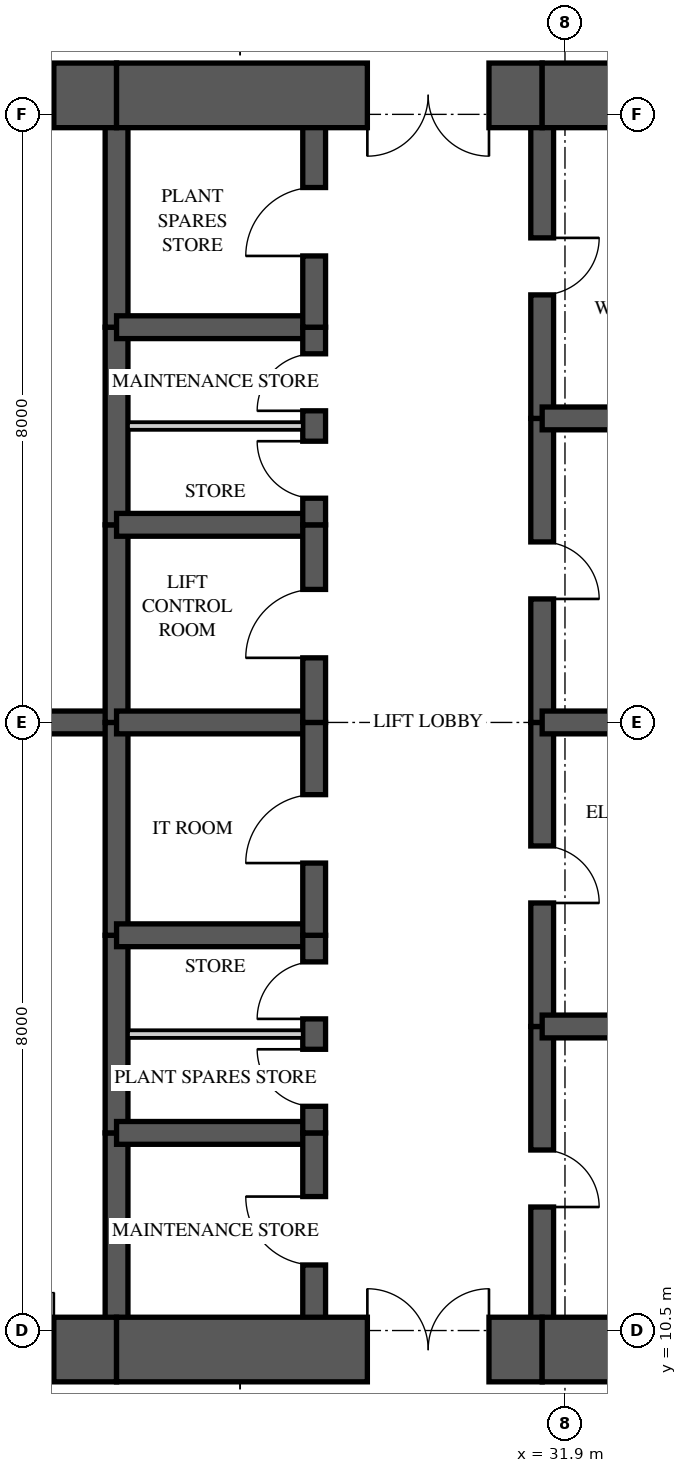
"""IFC4 building model, lengths in metres.
Left out: names, types, materials, properties, quantities, classifications, styles, units other than length and angle.
Written with IfcOpenShell. Run it as: python <this file> out.ifc"""

import sys

from ifc_helpers import new_model, si_unit, direction, frame, frame_2d, origin, place, context, subcontext, project, spatial, rectangle, extrude, element, fill, save


model = new_model("IFC4")
c1 = context("Model", 3, precision=1e-05, world=origin(), true_north=direction((0.0, 1.0)))
c2 = subcontext(c1, "Body", "Model", "MODEL_VIEW")
j1 = project(units=[si_unit("LENGTHUNIT", "METRE"), si_unit("PLANEANGLEUNIT", "RADIAN")], contexts=[c1])
p1 = place(None, origin())
s1 = spatial("IfcSite", under=j1, at=p1, CompositionType="ELEMENT")
p2 = place(p1, origin())
s2 = spatial("IfcBuilding", under=s1, at=p2, CompositionType="ELEMENT")
p3 = place(p2, frame((0.0, 0.0, 272.75)))
s3 = spatial("IfcBuildingStorey", under=s2, at=p3, CompositionType="ELEMENT", Elevation=272.75)
p4 = place(p3, frame((19.725, 10.25, 0.0), z_axis=(0.0, 0.0, 1.0), x_axis=(1.0, 0.0, 0.0)))
e1 = element("IfcWall", 1, at=p4, inside=s3, PredefinedType="SHEAR", context=c2, shape_type="SweptSolid", body=[
    extrude(rectangle(XDim=6.275, YDim=0.85, at=frame_2d((3.137, 0.0))), origin(), (0.0, 0.0, 1.0), 5.0),
])
p5 = place(p4, frame((4.7, 0.0, 0.0)))
e2 = element("IfcOpeningElement", 2, at=p5, cuts=e1, PredefinedType="OPENING", context=c2, shape_type="SweptSolid", body=[
    extrude(rectangle(XDim=0.75, YDim=2.1, at=frame_2d((0.375, 1.05))), frame((0.0, 0.435, 0.0), z_axis=(0.0, -1.0, 0.0), x_axis=(1.0, 0.0, 0.0)), (0.0, 0.0, 1.0), 0.87),
])
p6 = place(p3, frame((26.0, 10.25, 0.0), z_axis=(0.0, 0.0, 1.0), x_axis=(1.0, 0.0, 0.0)))
e3 = element("IfcWall", 3, at=p6, inside=s3, PredefinedType="SHEAR", context=c2, shape_type="SweptSolid", body=[
    extrude(rectangle(XDim=5.6, YDim=0.85, at=frame_2d((2.8, 0.0))), origin(), (0.0, 0.0, 1.0), 5.0),
])
p7 = place(p6, frame((3.3, 0.0, 0.0)))
e4 = element("IfcOpeningElement", 4, at=p7, cuts=e3, PredefinedType="OPENING", context=c2, shape_type="SweptSolid", body=[
    extrude(rectangle(XDim=1.6, YDim=2.1, at=frame_2d((0.8, 1.05))), frame((0.0, 0.435, 0.0), z_axis=(0.0, -1.0, 0.0), x_axis=(1.0, 0.0, 0.0)), (0.0, 0.0, 1.0), 0.87),
])
for number, where, z_axis, x_axis in (
    (5, (31.6, 10.25, 0.0), (0.0, 0.0, 1.0), (1.0, 0.0, 0.0)),
    (6, (35.9, 26.75, 0.0), (0.0, 0.0, 1.0), (-1.0, 0.0, 0.0)),
):
    element("IfcWall", number, at=place(p3, frame(where, z_axis=z_axis, x_axis=x_axis)), inside=s3, PredefinedType="SHEAR", context=c2, shape_type="SweptSolid", body=[
        extrude(rectangle(XDim=4.3, YDim=0.85, at=frame_2d((2.15, 0.0))), origin(), (0.0, 0.0, 1.0), 5.0),
    ])
p8 = place(p3, frame((31.6, 26.75, 0.0), z_axis=(0.0, 0.0, 1.0), x_axis=(-1.0, 0.0, 0.0)))
e7 = element("IfcWall", 7, at=p8, inside=s3, PredefinedType="SHEAR", context=c2, shape_type="SweptSolid", body=[
    extrude(rectangle(XDim=5.6, YDim=0.85, at=frame_2d((2.8, 0.0))), origin(), (0.0, 0.0, 1.0), 5.0),
])
p9 = place(p8, frame((0.7, 0.0, 0.0)))
e8 = element("IfcOpeningElement", 8, at=p9, cuts=e7, PredefinedType="OPENING", context=c2, shape_type="SweptSolid", body=[
    extrude(rectangle(XDim=1.6, YDim=2.1, at=frame_2d((0.8, 1.05))), frame((0.0, 0.435, 0.0), z_axis=(0.0, -1.0, 0.0), x_axis=(1.0, 0.0, 0.0)), (0.0, 0.0, 1.0), 0.87),
])
p10 = place(p3, frame((26.0, 26.75, 0.0), z_axis=(0.0, 0.0, 1.0), x_axis=(-1.0, 0.0, 0.0)))
e9 = element("IfcWall", 9, at=p10, inside=s3, PredefinedType="SHEAR", context=c2, shape_type="SweptSolid", body=[
    extrude(rectangle(XDim=6.275, YDim=0.85, at=frame_2d((3.137, 0.0))), origin(), (0.0, 0.0, 1.0), 5.0),
])
p11 = place(p10, frame((0.825, 0.0, 0.0)))
e10 = element("IfcOpeningElement", 10, at=p11, cuts=e9, PredefinedType="OPENING", context=c2, shape_type="SweptSolid", body=[
    extrude(rectangle(XDim=0.75, YDim=2.1, at=frame_2d((0.375, 1.05))), frame((0.0, 0.435, 0.0), z_axis=(0.0, -1.0, 0.0), x_axis=(1.0, 0.0, 0.0)), (0.0, 0.0, 1.0), 0.87),
])
p12 = place(p3, frame((26.0, 10.25, 0.0), z_axis=(0.0, 0.0, 1.0), x_axis=(0.0, 1.0, 0.0)))
e11 = element("IfcWall", 11, at=p12, inside=s3, PredefinedType="SHEAR", context=c2, shape_type="SweptSolid", body=[
    extrude(rectangle(XDim=2.85, YDim=0.3, at=frame_2d((1.425, 0.0))), origin(), (0.0, 0.0, 1.0), 5.0),
])
p13 = place(p3, frame((26.0, 13.1, 0.0), z_axis=(0.0, 0.0, 1.0), x_axis=(0.0, 1.0, 0.0)))
e12 = element("IfcWall", 12, at=p13, inside=s3, PredefinedType="SHEAR", context=c2, shape_type="SweptSolid", body=[
    extrude(rectangle(XDim=2.6, YDim=0.3, at=frame_2d((1.3, 0.0))), origin(), (0.0, 0.0, 1.0), 5.0),
])
p14 = place(p3, frame((26.0, 15.7, 0.0), z_axis=(0.0, 0.0, 1.0), x_axis=(0.0, 1.0, 0.0)))
e13 = element("IfcWall", 13, at=p14, inside=s3, PredefinedType="SHEAR", context=c2, shape_type="SweptSolid", body=[
    extrude(rectangle(XDim=2.8, YDim=0.3, at=frame_2d((1.4, 0.0))), origin(), (0.0, 0.0, 1.0), 5.0),
])
p15 = place(p3, frame((26.0, 18.5, 0.0), z_axis=(0.0, 0.0, 1.0), x_axis=(0.0, 1.0, 0.0)))
e14 = element("IfcWall", 14, at=p15, inside=s3, PredefinedType="SHEAR", context=c2, shape_type="SweptSolid", body=[
    extrude(rectangle(XDim=2.6, YDim=0.3, at=frame_2d((1.3, 0.0))), origin(), (0.0, 0.0, 1.0), 5.0),
])
p16 = place(p3, frame((26.0, 21.1, 0.0), z_axis=(0.0, 0.0, 1.0), x_axis=(0.0, 1.0, 0.0)))
e15 = element("IfcWall", 15, at=p16, inside=s3, PredefinedType="SHEAR", context=c2, shape_type="SweptSolid", body=[
    extrude(rectangle(XDim=2.6, YDim=0.3, at=frame_2d((1.3, 0.0))), origin(), (0.0, 0.0, 1.0), 5.0),
])
p17 = place(p3, frame((26.0, 23.7, 0.0), z_axis=(0.0, 0.0, 1.0), x_axis=(0.0, 1.0, 0.0)))
e16 = element("IfcWall", 16, at=p17, inside=s3, PredefinedType="SHEAR", context=c2, shape_type="SweptSolid", body=[
    extrude(rectangle(XDim=3.05, YDim=0.3, at=frame_2d((1.525, 0.0))), origin(), (0.0, 0.0, 1.0), 5.0),
])
p18 = place(p3, frame((28.6, 10.25, 0.0), z_axis=(0.0, 0.0, 1.0), x_axis=(0.0, 1.0, 0.0)))
e17 = element("IfcWall", 17, at=p18, inside=s3, PredefinedType="SHEAR", context=c2, shape_type="SweptSolid", body=[
    extrude(rectangle(XDim=2.85, YDim=0.3, at=frame_2d((1.425, 0.0))), origin(), (0.0, 0.0, 1.0), 5.0),
])
p19 = place(p18, frame((1.113, 0.0, 0.0)))
e18 = element("IfcOpeningElement", 18, at=p19, cuts=e17, PredefinedType="OPENING", context=c2, shape_type="SweptSolid", body=[
    extrude(rectangle(XDim=0.9, YDim=2.1, at=frame_2d((0.45, 1.05))), frame((0.0, 0.16, 0.0), z_axis=(0.0, -1.0, 0.0), x_axis=(1.0, 0.0, 0.0)), (0.0, 0.0, 1.0), 0.32),
])
p20 = place(p3, frame((28.6, 13.1, 0.0), z_axis=(0.0, 0.0, 1.0), x_axis=(0.0, 1.0, 0.0)))
e19 = element("IfcWall", 19, at=p20, inside=s3, PredefinedType="SHEAR", context=c2, shape_type="SweptSolid", body=[
    extrude(rectangle(XDim=2.6, YDim=0.3, at=frame_2d((1.3, 0.0))), origin(), (0.0, 0.0, 1.0), 5.0),
])
p21 = place(p20, frame((0.35, 0.0, 0.0)))
e20 = element("IfcOpeningElement", 20, at=p21, cuts=e19, PredefinedType="OPENING", context=c2, shape_type="SweptSolid", body=[
    extrude(rectangle(XDim=0.75, YDim=2.1, at=frame_2d((0.375, 1.05))), frame((0.0, 0.16, 0.0), z_axis=(0.0, -1.0, 0.0), x_axis=(1.0, 0.0, 0.0)), (0.0, 0.0, 1.0), 0.32),
])
p22 = place(p20, frame((1.5, 0.0, 0.0)))
e21 = element("IfcOpeningElement", 21, at=p22, cuts=e19, PredefinedType="OPENING", context=c2, shape_type="SweptSolid", body=[
    extrude(rectangle(XDim=0.75, YDim=2.1, at=frame_2d((0.375, 1.05))), frame((0.0, 0.16, 0.0), z_axis=(0.0, -1.0, 0.0), x_axis=(1.0, 0.0, 0.0)), (0.0, 0.0, 1.0), 0.32),
])
p23 = place(p3, frame((28.6, 15.7, 0.0), z_axis=(0.0, 0.0, 1.0), x_axis=(0.0, 1.0, 0.0)))
e22 = element("IfcWall", 22, at=p23, inside=s3, PredefinedType="SHEAR", context=c2, shape_type="SweptSolid", body=[
    extrude(rectangle(XDim=2.8, YDim=0.3, at=frame_2d((1.4, 0.0))), origin(), (0.0, 0.0, 1.0), 5.0),
])
p24 = place(p23, frame((0.95, 0.0, 0.0)))
e23 = element("IfcOpeningElement", 23, at=p24, cuts=e22, PredefinedType="OPENING", context=c2, shape_type="SweptSolid", body=[
    extrude(rectangle(XDim=0.9, YDim=2.1, at=frame_2d((0.45, 1.05))), frame((0.0, 0.16, 0.0), z_axis=(0.0, -1.0, 0.0), x_axis=(1.0, 0.0, 0.0)), (0.0, 0.0, 1.0), 0.32),
])
p25 = place(p3, frame((28.6, 18.5, 0.0), z_axis=(0.0, 0.0, 1.0), x_axis=(0.0, 1.0, 0.0)))
e24 = element("IfcWall", 24, at=p25, inside=s3, PredefinedType="SHEAR", context=c2, shape_type="SweptSolid", body=[
    extrude(rectangle(XDim=2.6, YDim=0.3, at=frame_2d((1.3, 0.0))), origin(), (0.0, 0.0, 1.0), 5.0),
])
p26 = place(p25, frame((0.85, 0.0, 0.0)))
e25 = element("IfcOpeningElement", 25, at=p26, cuts=e24, PredefinedType="OPENING", context=c2, shape_type="SweptSolid", body=[
    extrude(rectangle(XDim=0.9, YDim=2.1, at=frame_2d((0.45, 1.05))), frame((0.0, 0.16, 0.0), z_axis=(0.0, -1.0, 0.0), x_axis=(1.0, 0.0, 0.0)), (0.0, 0.0, 1.0), 0.32),
])
p27 = place(p3, frame((28.6, 21.1, 0.0), z_axis=(0.0, 0.0, 1.0), x_axis=(0.0, 1.0, 0.0)))
e26 = element("IfcWall", 26, at=p27, inside=s3, PredefinedType="SHEAR", context=c2, shape_type="SweptSolid", body=[
    extrude(rectangle(XDim=2.6, YDim=0.3, at=frame_2d((1.3, 0.0))), origin(), (0.0, 0.0, 1.0), 5.0),
])
p28 = place(p27, frame((0.35, 0.0, 0.0)))
e27 = element("IfcOpeningElement", 27, at=p28, cuts=e26, PredefinedType="OPENING", context=c2, shape_type="SweptSolid", body=[
    extrude(rectangle(XDim=0.75, YDim=2.1, at=frame_2d((0.375, 1.05))), frame((0.0, 0.16, 0.0), z_axis=(0.0, -1.0, 0.0), x_axis=(1.0, 0.0, 0.0)), (0.0, 0.0, 1.0), 0.32),
])
p29 = place(p27, frame((1.5, 0.0, 0.0)))
e28 = element("IfcOpeningElement", 28, at=p29, cuts=e26, PredefinedType="OPENING", context=c2, shape_type="SweptSolid", body=[
    extrude(rectangle(XDim=0.75, YDim=2.1, at=frame_2d((0.375, 1.05))), frame((0.0, 0.16, 0.0), z_axis=(0.0, -1.0, 0.0), x_axis=(1.0, 0.0, 0.0)), (0.0, 0.0, 1.0), 0.32),
])
p30 = place(p3, frame((28.6, 23.7, 0.0), z_axis=(0.0, 0.0, 1.0), x_axis=(0.0, 1.0, 0.0)))
e29 = element("IfcWall", 29, at=p30, inside=s3, PredefinedType="SHEAR", context=c2, shape_type="SweptSolid", body=[
    extrude(rectangle(XDim=3.05, YDim=0.3, at=frame_2d((1.525, 0.0))), origin(), (0.0, 0.0, 1.0), 5.0),
])
p31 = place(p30, frame((0.938, 0.0, 0.0)))
e30 = element("IfcOpeningElement", 30, at=p31, cuts=e29, PredefinedType="OPENING", context=c2, shape_type="SweptSolid", body=[
    extrude(rectangle(XDim=0.9, YDim=2.1, at=frame_2d((0.45, 1.05))), frame((0.0, 0.16, 0.0), z_axis=(0.0, -1.0, 0.0), x_axis=(1.0, 0.0, 0.0)), (0.0, 0.0, 1.0), 0.32),
])
p32 = place(p3, frame((31.6, 10.25, 0.0), z_axis=(0.0, 0.0, 1.0), x_axis=(0.0, 1.0, 0.0)))
e31 = element("IfcWall", 31, at=p32, inside=s3, PredefinedType="SHEAR", context=c2, shape_type="SweptSolid", body=[
    extrude(rectangle(XDim=4.25, YDim=0.3, at=frame_2d((2.125, 0.0))), origin(), (0.0, 0.0, 1.0), 5.0),
])
p33 = place(p32, frame((1.875, 0.0, 0.0)))
e32 = element("IfcOpeningElement", 32, at=p33, cuts=e31, PredefinedType="OPENING", context=c2, shape_type="SweptSolid", body=[
    extrude(rectangle(XDim=0.75, YDim=2.1, at=frame_2d((0.375, 1.05))), frame((0.0, 0.16, 0.0), z_axis=(0.0, -1.0, 0.0), x_axis=(1.0, 0.0, 0.0)), (0.0, 0.0, 1.0), 0.32),
])
p34 = place(p3, frame((31.6, 14.5, 0.0), z_axis=(0.0, 0.0, 1.0), x_axis=(0.0, 1.0, 0.0)))
e33 = element("IfcWall", 33, at=p34, inside=s3, PredefinedType="SHEAR", context=c2, shape_type="SweptSolid", body=[
    extrude(rectangle(XDim=4.0, YDim=0.3, at=frame_2d((2.0, 0.0))), origin(), (0.0, 0.0, 1.0), 5.0),
])
p35 = place(p34, frame((1.625, 0.0, 0.0)))
e34 = element("IfcOpeningElement", 34, at=p35, cuts=e33, PredefinedType="OPENING", context=c2, shape_type="SweptSolid", body=[
    extrude(rectangle(XDim=0.75, YDim=2.1, at=frame_2d((0.375, 1.05))), frame((0.0, 0.16, 0.0), z_axis=(0.0, -1.0, 0.0), x_axis=(1.0, 0.0, 0.0)), (0.0, 0.0, 1.0), 0.32),
])
p36 = place(p3, frame((31.6, 18.5, 0.0), z_axis=(0.0, 0.0, 1.0), x_axis=(0.0, 1.0, 0.0)))
e35 = element("IfcWall", 35, at=p36, inside=s3, PredefinedType="SHEAR", context=c2, shape_type="SweptSolid", body=[
    extrude(rectangle(XDim=4.0, YDim=0.3, at=frame_2d((2.0, 0.0))), origin(), (0.0, 0.0, 1.0), 5.0),
])
p37 = place(p36, frame((1.625, 0.0, 0.0)))
e36 = element("IfcOpeningElement", 36, at=p37, cuts=e35, PredefinedType="OPENING", context=c2, shape_type="SweptSolid", body=[
    extrude(rectangle(XDim=0.75, YDim=2.1, at=frame_2d((0.375, 1.05))), frame((0.0, 0.16, 0.0), z_axis=(0.0, -1.0, 0.0), x_axis=(1.0, 0.0, 0.0)), (0.0, 0.0, 1.0), 0.32),
])
p38 = place(p3, frame((31.6, 22.5, 0.0), z_axis=(0.0, 0.0, 1.0), x_axis=(0.0, 1.0, 0.0)))
e37 = element("IfcWall", 37, at=p38, inside=s3, PredefinedType="SHEAR", context=c2, shape_type="SweptSolid", body=[
    extrude(rectangle(XDim=4.25, YDim=0.3, at=frame_2d((2.125, 0.0))), origin(), (0.0, 0.0, 1.0), 5.0),
])
p39 = place(p38, frame((1.625, 0.0, 0.0)))
e38 = element("IfcOpeningElement", 38, at=p39, cuts=e37, PredefinedType="OPENING", context=c2, shape_type="SweptSolid", body=[
    extrude(rectangle(XDim=0.75, YDim=2.1, at=frame_2d((0.375, 1.05))), frame((0.0, 0.16, 0.0), z_axis=(0.0, -1.0, 0.0), x_axis=(1.0, 0.0, 0.0)), (0.0, 0.0, 1.0), 0.32),
])
p40 = place(p3, frame((23.6, 18.5, 0.0), z_axis=(0.0, 0.0, 1.0), x_axis=(1.0, 0.0, 0.0)))
e39 = element("IfcWall", 39, at=p40, inside=s3, PredefinedType="SHEAR", context=c2, shape_type="SweptSolid", body=[
    extrude(rectangle(XDim=2.4, YDim=0.3, at=frame_2d((1.2, 0.0))), origin(), (0.0, 0.0, 1.0), 5.0),
])
for number, where, z_axis, x_axis in (
    (40, (26.0, 13.1, 0.0), (0.0, 0.0, 1.0), (1.0, 0.0, 0.0)),
    (41, (26.0, 15.7, 0.0), (0.0, 0.0, 1.0), (1.0, 0.0, 0.0)),
    (42, (26.0, 18.5, 0.0), (0.0, 0.0, 1.0), (1.0, 0.0, 0.0)),
    (43, (26.0, 21.1, 0.0), (0.0, 0.0, 1.0), (1.0, 0.0, 0.0)),
    (44, (26.0, 23.7, 0.0), (0.0, 0.0, 1.0), (1.0, 0.0, 0.0)),
):
    element("IfcWall", number, at=place(p3, frame(where, z_axis=z_axis, x_axis=x_axis)), inside=s3, PredefinedType="SHEAR", context=c2, shape_type="SweptSolid", body=[
        extrude(rectangle(XDim=2.6, YDim=0.3, at=frame_2d((1.3, 0.0))), origin(), (0.0, 0.0, 1.0), 5.0),
    ])
for number, where, z_axis, x_axis in (
    (45, (31.6, 14.5, 0.0), (0.0, 0.0, 1.0), (1.0, 0.0, 0.0)),
    (46, (31.6, 18.5, 0.0), (0.0, 0.0, 1.0), (1.0, 0.0, 0.0)),
    (47, (31.6, 22.5, 0.0), (0.0, 0.0, 1.0), (1.0, 0.0, 0.0)),
):
    element("IfcWall", number, at=place(p3, frame(where, z_axis=z_axis, x_axis=x_axis)), inside=s3, PredefinedType="SHEAR", context=c2, shape_type="SweptSolid", body=[
        extrude(rectangle(XDim=4.3, YDim=0.3, at=frame_2d((2.15, 0.0))), origin(), (0.0, 0.0, 1.0), 5.0),
    ])
for number, where, z_axis, x_axis in (
    (48, (26.15, 14.4, 0.0), (0.0, 0.0, 1.0), (1.0, 0.0, 0.0)),
    (49, (26.15, 22.4, 0.0), (0.0, 0.0, 1.0), (1.0, 0.0, 0.0)),
):
    element("IfcWall", number, at=place(p3, frame(where, z_axis=z_axis, x_axis=x_axis)), inside=s3, PredefinedType="PARTITIONING", context=c2, shape_type="SweptSolid", body=[
        extrude(rectangle(XDim=2.3, YDim=0.1, at=frame_2d((1.15, 0.0))), origin(), (0.0, 0.0, 1.0), 4.72),
    ])
p41 = place(p19, origin())
e50 = element("IfcDoor", 50, at=p41, inside=s3, OperationType="SINGLE_SWING_RIGHT", PredefinedType="DOOR", context=c2, shape_type="SweptSolid", body=[
    extrude(rectangle(XDim=0.9, YDim=2.1, at=frame_2d((0.45, 1.05))), frame((0.0, 0.025, 0.0), z_axis=(0.0, -1.0, 0.0), x_axis=(1.0, 0.0, 0.0)), (0.0, 0.0, 1.0), 0.05),
])
fill(e18, e50)
p42 = place(p21, origin())
e51 = element("IfcDoor", 51, at=p42, inside=s3, OperationType="SINGLE_SWING_RIGHT", PredefinedType="DOOR", context=c2, shape_type="SweptSolid", body=[
    extrude(rectangle(XDim=0.75, YDim=2.1, at=frame_2d((0.375, 1.05))), frame((0.0, 0.025, 0.0), z_axis=(0.0, -1.0, 0.0), x_axis=(1.0, 0.0, 0.0)), (0.0, 0.0, 1.0), 0.05),
])
fill(e20, e51)
p43 = place(p22, origin())
e52 = element("IfcDoor", 52, at=p43, inside=s3, OperationType="SINGLE_SWING_LEFT", PredefinedType="DOOR", context=c2, shape_type="SweptSolid", body=[
    extrude(rectangle(XDim=0.75, YDim=2.1, at=frame_2d((0.375, 1.05))), frame((0.0, 0.025, 0.0), z_axis=(0.0, -1.0, 0.0), x_axis=(1.0, 0.0, 0.0)), (0.0, 0.0, 1.0), 0.05),
])
fill(e21, e52)
p44 = place(p24, origin())
e53 = element("IfcDoor", 53, at=p44, inside=s3, OperationType="SINGLE_SWING_LEFT", PredefinedType="DOOR", context=c2, shape_type="SweptSolid", body=[
    extrude(rectangle(XDim=0.9, YDim=2.1, at=frame_2d((0.45, 1.05))), frame((0.0, 0.025, 0.0), z_axis=(0.0, -1.0, 0.0), x_axis=(1.0, 0.0, 0.0)), (0.0, 0.0, 1.0), 0.05),
])
fill(e23, e53)
p45 = place(p26, origin())
e54 = element("IfcDoor", 54, at=p45, inside=s3, OperationType="SINGLE_SWING_LEFT", PredefinedType="DOOR", context=c2, shape_type="SweptSolid", body=[
    extrude(rectangle(XDim=0.9, YDim=2.1, at=frame_2d((0.45, 1.05))), frame((0.0, 0.025, 0.0), z_axis=(0.0, -1.0, 0.0), x_axis=(1.0, 0.0, 0.0)), (0.0, 0.0, 1.0), 0.05),
])
fill(e25, e54)
p46 = place(p28, origin())
e55 = element("IfcDoor", 55, at=p46, inside=s3, OperationType="SINGLE_SWING_RIGHT", PredefinedType="DOOR", context=c2, shape_type="SweptSolid", body=[
    extrude(rectangle(XDim=0.75, YDim=2.1, at=frame_2d((0.375, 1.05))), frame((0.0, 0.025, 0.0), z_axis=(0.0, -1.0, 0.0), x_axis=(1.0, 0.0, 0.0)), (0.0, 0.0, 1.0), 0.05),
])
fill(e27, e55)
p47 = place(p29, origin())
e56 = element("IfcDoor", 56, at=p47, inside=s3, OperationType="SINGLE_SWING_LEFT", PredefinedType="DOOR", context=c2, shape_type="SweptSolid", body=[
    extrude(rectangle(XDim=0.75, YDim=2.1, at=frame_2d((0.375, 1.05))), frame((0.0, 0.025, 0.0), z_axis=(0.0, -1.0, 0.0), x_axis=(1.0, 0.0, 0.0)), (0.0, 0.0, 1.0), 0.05),
])
fill(e28, e56)
p48 = place(p31, origin())
e57 = element("IfcDoor", 57, at=p48, inside=s3, OperationType="SINGLE_SWING_LEFT", PredefinedType="DOOR", context=c2, shape_type="SweptSolid", body=[
    extrude(rectangle(XDim=0.9, YDim=2.1, at=frame_2d((0.45, 1.05))), frame((0.0, 0.025, 0.0), z_axis=(0.0, -1.0, 0.0), x_axis=(1.0, 0.0, 0.0)), (0.0, 0.0, 1.0), 0.05),
])
fill(e30, e57)
p49 = place(p7, origin())
e58 = element("IfcDoor", 58, at=p49, inside=s3, OperationType="DOUBLE_DOOR_SINGLE_SWING", PredefinedType="DOOR", context=c2, shape_type="SweptSolid", body=[
    extrude(rectangle(XDim=1.6, YDim=2.1, at=frame_2d((0.8, 1.05))), frame((0.0, 0.025, 0.0), z_axis=(0.0, -1.0, 0.0), x_axis=(1.0, 0.0, 0.0)), (0.0, 0.0, 1.0), 0.05),
])
fill(e4, e58)
p50 = place(p9, origin())
e59 = element("IfcDoor", 59, at=p50, inside=s3, OperationType="DOUBLE_DOOR_SINGLE_SWING", PredefinedType="DOOR", context=c2, shape_type="SweptSolid", body=[
    extrude(rectangle(XDim=1.6, YDim=2.1, at=frame_2d((0.8, 1.05))), frame((0.0, 0.025, 0.0), z_axis=(0.0, -1.0, 0.0), x_axis=(1.0, 0.0, 0.0)), (0.0, 0.0, 1.0), 0.05),
])
fill(e8, e59)
p51 = place(p33, frame((0.75, 0.0, 0.0), z_axis=(0.0, 0.0, 1.0), x_axis=(-1.0, 0.0, 0.0)))
e60 = element("IfcDoor", 60, at=p51, inside=s3, OperationType="SINGLE_SWING_RIGHT", PredefinedType="DOOR", context=c2, shape_type="SweptSolid", body=[
    extrude(rectangle(XDim=0.75, YDim=2.1, at=frame_2d((0.375, 1.05))), frame((0.0, 0.025, 0.0), z_axis=(0.0, -1.0, 0.0), x_axis=(1.0, 0.0, 0.0)), (0.0, 0.0, 1.0), 0.05),
])
fill(e32, e60)
p52 = place(p35, frame((0.75, 0.0, 0.0), z_axis=(0.0, 0.0, 1.0), x_axis=(-1.0, 0.0, 0.0)))
e61 = element("IfcDoor", 61, at=p52, inside=s3, OperationType="SINGLE_SWING_RIGHT", PredefinedType="DOOR", context=c2, shape_type="SweptSolid", body=[
    extrude(rectangle(XDim=0.75, YDim=2.1, at=frame_2d((0.375, 1.05))), frame((0.0, 0.025, 0.0), z_axis=(0.0, -1.0, 0.0), x_axis=(1.0, 0.0, 0.0)), (0.0, 0.0, 1.0), 0.05),
])
fill(e34, e61)
p53 = place(p37, frame((0.75, 0.0, 0.0), z_axis=(0.0, 0.0, 1.0), x_axis=(-1.0, 0.0, 0.0)))
e62 = element("IfcDoor", 62, at=p53, inside=s3, OperationType="SINGLE_SWING_RIGHT", PredefinedType="DOOR", context=c2, shape_type="SweptSolid", body=[
    extrude(rectangle(XDim=0.75, YDim=2.1, at=frame_2d((0.375, 1.05))), frame((0.0, 0.025, 0.0), z_axis=(0.0, -1.0, 0.0), x_axis=(1.0, 0.0, 0.0)), (0.0, 0.0, 1.0), 0.05),
])
fill(e36, e62)
p54 = place(p39, frame((0.75, 0.0, 0.0), z_axis=(0.0, 0.0, 1.0), x_axis=(-1.0, 0.0, 0.0)))
e63 = element("IfcDoor", 63, at=p54, inside=s3, OperationType="SINGLE_SWING_LEFT", PredefinedType="DOOR", context=c2, shape_type="SweptSolid", body=[
    extrude(rectangle(XDim=0.75, YDim=2.1, at=frame_2d((0.375, 1.05))), frame((0.0, 0.025, 0.0), z_axis=(0.0, -1.0, 0.0), x_axis=(1.0, 0.0, 0.0)), (0.0, 0.0, 1.0), 0.05),
])
fill(e38, e63)
p55 = place(p5, origin())
e64 = element("IfcDoor", 64, at=p55, inside=s3, OperationType="SINGLE_SWING_RIGHT", PredefinedType="DOOR", context=c2, shape_type="SweptSolid", body=[
    extrude(rectangle(XDim=0.75, YDim=2.1, at=frame_2d((0.375, 1.05))), frame((0.0, 0.025, 0.0), z_axis=(0.0, -1.0, 0.0), x_axis=(1.0, 0.0, 0.0)), (0.0, 0.0, 1.0), 0.05),
])
fill(e2, e64)
p56 = place(p11, origin())
e65 = element("IfcDoor", 65, at=p56, inside=s3, OperationType="SINGLE_SWING_RIGHT", PredefinedType="DOOR", context=c2, shape_type="SweptSolid", body=[
    extrude(rectangle(XDim=0.75, YDim=2.1, at=frame_2d((0.375, 1.05))), frame((0.0, 0.025, 0.0), z_axis=(0.0, -1.0, 0.0), x_axis=(1.0, 0.0, 0.0)), (0.0, 0.0, 1.0), 0.05),
])
fill(e10, e65)
save(model, sys.argv[1])
